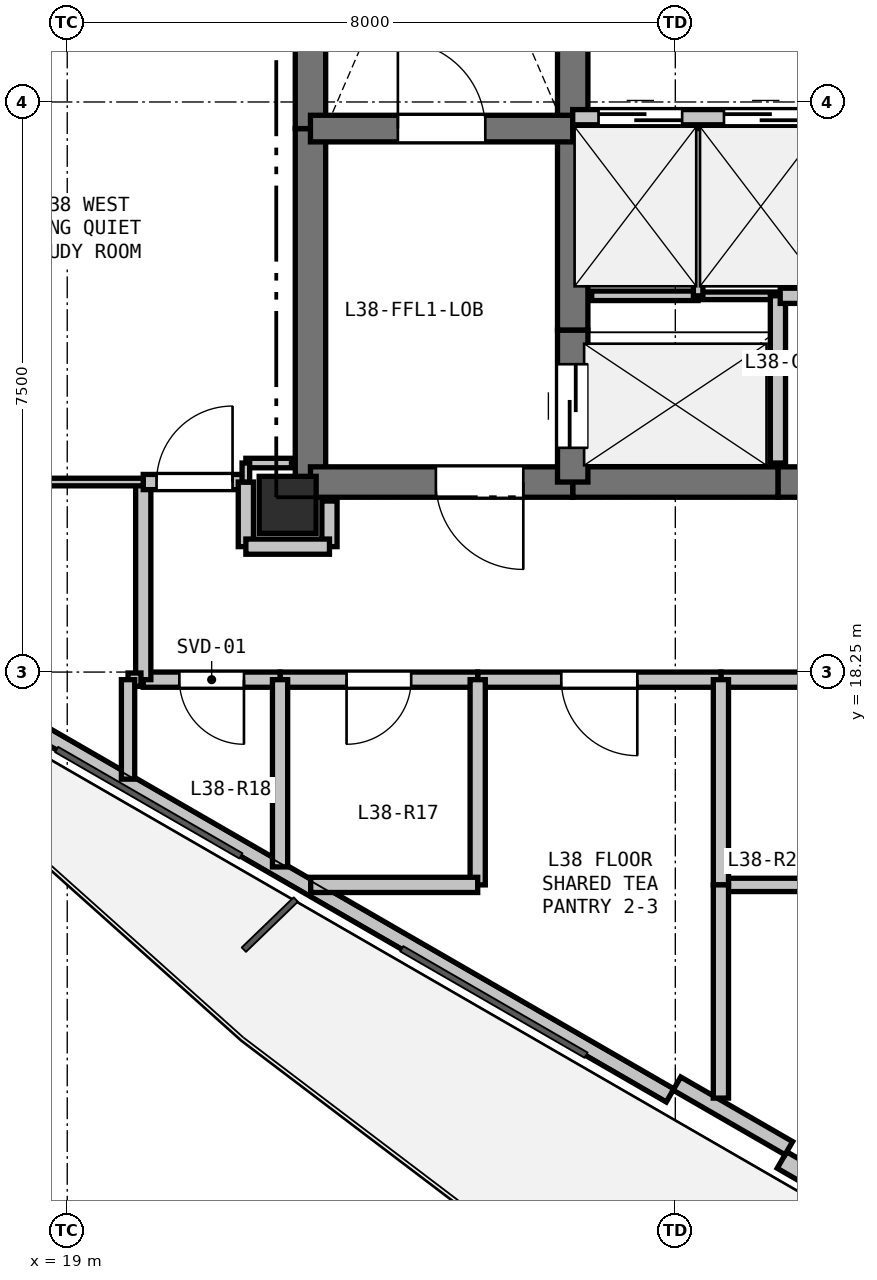
"""IFC4 building model, lengths in metres.
Left out: names, types, materials, properties, quantities, classifications, styles, units other than length and angle.
Written with IfcOpenShell. Run it as: python <this file> out.ifc"""

import sys

from ifc_helpers import new_model, si_unit, direction, frame, frame_2d, origin, origin_2d, place, context, subcontext, project, spatial, rectangle, extrude, element, fill, save


model = new_model("IFC4")
c1 = context("Model", 3, precision=1e-05, world=origin(), true_north=direction((0.0, 1.0)))
c2 = subcontext(c1, "Body", "Model", "MODEL_VIEW")
j1 = project(units=[si_unit("LENGTHUNIT", "METRE"), si_unit("PLANEANGLEUNIT", "RADIAN")], contexts=[c1])
p1 = place(None, origin())
s1 = spatial("IfcSite", under=j1, at=p1, CompositionType="ELEMENT")
p2 = place(p1, origin())
s2 = spatial("IfcBuilding", under=s1, at=p2, CompositionType="ELEMENT")
p3 = place(p2, frame((0.0, 0.0, 137.7)))
s3 = spatial("IfcBuildingStorey", under=s2, at=p3, CompositionType="ELEMENT", Elevation=137.7)
p4 = place(p3, frame((21.9, 20.45, 0.0), z_axis=(0.0, 0.0, 1.0), x_axis=(1.0, 0.0, 0.0)))
e1 = element("IfcColumn", 1, at=p4, inside=s3, PredefinedType="COLUMN", context=c2, shape_type="SweptSolid", body=[
    extrude(rectangle(XDim=0.75, YDim=0.75, at=origin_2d()), origin(), (0.0, 0.0, 1.0), 3.3),
])
p5 = place(p3, frame((38.091, 6.237, 0.0), z_axis=(0.0, 0.0, 1.0), x_axis=(-0.86602239209, 0.500005216371, 0.0)))
e2 = element("IfcWall", 2, at=p5, inside=s3, PredefinedType="SOLIDWALL", context=c2, shape_type="SweptSolid", body=[
    extrude(rectangle(XDim=11.186, YDim=0.25, at=frame_2d((5.593, 0.0))), origin(), (0.0, 0.0, 1.0), 2.68),
])
p6 = place(p5, frame((7.095, 0.0, 0.0)))
e3 = element("IfcOpeningElement", 3, at=p6, cuts=e2, PredefinedType="OPENING", context=c2, shape_type="SweptSolid", body=[
    extrude(rectangle(XDim=1.0, YDim=2.1, at=frame_2d((0.5, 1.05))), frame((0.0, 0.135, 0.0), z_axis=(0.0, -1.0, 0.0), x_axis=(1.0, 0.0, 0.0)), (0.0, 0.0, 1.0), 0.27),
])
p7 = place(p5, frame((2.02, 0.0, 0.9)))
e4 = element("IfcOpeningElement", 4, at=p7, cuts=e2, PredefinedType="OPENING", context=c2, shape_type="SweptSolid", body=[
    extrude(rectangle(XDim=1.2, YDim=1.4, at=frame_2d((0.6, 0.7))), frame((0.0, 0.135, 0.0), z_axis=(0.0, -1.0, 0.0), x_axis=(1.0, 0.0, 0.0)), (0.0, 0.0, 1.0), 0.27),
])
p8 = place(p3, frame((26.931, 12.68, 0.0), z_axis=(0.0, 0.0, 1.0), x_axis=(-0.866026619769, 0.499997893847, 0.0)))
e5 = element("IfcWall", 5, at=p8, inside=s3, PredefinedType="PARAPET", context=c2, shape_type="SweptSolid", body=[
    extrude(rectangle(XDim=10.486, YDim=0.2, at=frame_2d((5.243, 0.0))), origin(), (0.0, 0.0, 1.0), 0.2),
])
p9 = place(p3, frame((28.493, 11.986, 0.0), z_axis=(0.0, 0.0, 1.0), x_axis=(-0.86605165483, 0.499954529098, 0.0)))
e6 = element("IfcWall", 6, at=p9, inside=s3, PredefinedType="PARAPET", context=c2, shape_type="SweptSolid", body=[
    extrude(rectangle(XDim=1.7, YDim=0.2, at=frame_2d((0.85, 0.0))), origin(), (0.0, 0.0, 1.0), 2.68),
])
p10 = place(p3, frame((22.2, 20.75, 0.0), z_axis=(0.0, 0.0, 1.0), x_axis=(0.0, 1.0, 0.0)))
e7 = element("IfcWall", 7, at=p10, inside=s3, PredefinedType="SHEAR", context=c2, shape_type="SweptSolid", body=[
    extrude(rectangle(XDim=4.65, YDim=0.4, at=frame_2d((2.325, 0.0))), origin(), (0.0, 0.0, 1.0), 3.06),
])
p11 = place(p3, frame((22.2, 25.4, 0.0), z_axis=(0.0, 0.0, 1.0), x_axis=(0.0, 1.0, 0.0)))
e8 = element("IfcWall", 8, at=p11, inside=s3, PredefinedType="SHEAR", context=c2, shape_type="SweptSolid", body=[
    extrude(rectangle(XDim=7.35, YDim=0.4, at=frame_2d((3.675, 0.0))), origin(), (0.0, 0.0, 1.0), 3.06),
])
p12 = place(p3, frame((30.6, 20.75, 0.0), z_axis=(0.0, 0.0, 1.0), x_axis=(-1.0, 0.0, 0.0)))
e9 = element("IfcWall", 9, at=p12, inside=s3, PredefinedType="SHEAR", context=c2, shape_type="SweptSolid", body=[
    extrude(rectangle(XDim=2.25, YDim=0.4, at=frame_2d((1.125, 0.0))), origin(), (0.0, 0.0, 1.0), 3.06),
])
p13 = place(p12, frame((0.7, 0.0, 0.0)))
e10 = element("IfcOpeningElement", 10, at=p13, cuts=e9, PredefinedType="OPENING", context=c2, shape_type="SweptSolid", body=[
    extrude(rectangle(XDim=0.85, YDim=2.1, at=frame_2d((0.425, 1.05))), frame((0.0, 0.21, 0.0), z_axis=(0.0, -1.0, 0.0), x_axis=(1.0, 0.0, 0.0)), (0.0, 0.0, 1.0), 0.42),
])
p14 = place(p3, frame((28.35, 20.75, 0.0), z_axis=(0.0, 0.0, 1.0), x_axis=(-1.0, 0.0, 0.0)))
e11 = element("IfcWall", 11, at=p14, inside=s3, PredefinedType="SHEAR", context=c2, shape_type="SweptSolid", body=[
    extrude(rectangle(XDim=2.7, YDim=0.4, at=frame_2d((1.35, 0.0))), origin(), (0.0, 0.0, 1.0), 3.06),
])
p15 = place(p3, frame((25.65, 20.75, 0.0), z_axis=(0.0, 0.0, 1.0), x_axis=(-1.0, 0.0, 0.0)))
e12 = element("IfcWall", 12, at=p15, inside=s3, PredefinedType="SHEAR", context=c2, shape_type="SweptSolid", body=[
    extrude(rectangle(XDim=3.45, YDim=0.4, at=frame_2d((1.725, 0.0))), origin(), (0.0, 0.0, 1.0), 3.06),
])
p16 = place(p15, frame((0.65, 0.0, 0.0)))
e13 = element("IfcOpeningElement", 13, at=p16, cuts=e12, PredefinedType="OPENING", context=c2, shape_type="SweptSolid", body=[
    extrude(rectangle(XDim=1.15, YDim=2.15, at=frame_2d((0.575, 1.075))), frame((0.0, 0.21, 0.0), z_axis=(0.0, -1.0, 0.0), x_axis=(1.0, 0.0, 0.0)), (0.0, 0.0, 1.0), 0.42),
])
p17 = place(p3, frame((25.65, 20.75, 0.0), z_axis=(0.0, 0.0, 1.0), x_axis=(0.0, 1.0, 0.0)))
e14 = element("IfcWall", 14, at=p17, inside=s3, PredefinedType="SHEAR", context=c2, shape_type="SweptSolid", body=[
    extrude(rectangle(XDim=2.0, YDim=0.4, at=frame_2d((1.0, 0.0))), origin(), (0.0, 0.0, 1.0), 3.06),
])
p18 = place(p17, frame((0.45, 0.0, 0.0)))
e15 = element("IfcOpeningElement", 15, at=p18, cuts=e14, PredefinedType="OPENING", context=c2, shape_type="SweptSolid", body=[
    extrude(rectangle(XDim=1.1, YDim=2.15, at=frame_2d((0.55, 1.075))), frame((0.0, 0.21, 0.0), z_axis=(0.0, -1.0, 0.0), x_axis=(1.0, 0.0, 0.0)), (0.0, 0.0, 1.0), 0.42),
])
p19 = place(p3, frame((25.65, 22.75, 0.0), z_axis=(0.0, 0.0, 1.0), x_axis=(0.0, 1.0, 0.0)))
e16 = element("IfcWall", 16, at=p19, inside=s3, PredefinedType="SHEAR", context=c2, shape_type="SweptSolid", body=[
    extrude(rectangle(XDim=2.8, YDim=0.4, at=frame_2d((1.4, 0.0))), origin(), (0.0, 0.0, 1.0), 3.06),
])
p20 = place(p3, frame((25.65, 25.55, 0.0), z_axis=(0.0, 0.0, 1.0), x_axis=(0.0, 1.0, 0.0)))
e17 = element("IfcWall", 17, at=p20, inside=s3, PredefinedType="SHEAR", context=c2, shape_type="SweptSolid", body=[
    extrude(rectangle(XDim=2.4, YDim=0.4, at=frame_2d((1.2, 0.0))), origin(), (0.0, 0.0, 1.0), 3.06),
])
p21 = place(p3, frame((22.2, 25.4, 0.0), z_axis=(0.0, 0.0, 1.0), x_axis=(1.0, 0.0, 0.0)))
e18 = element("IfcWall", 18, at=p21, inside=s3, PredefinedType="SHEAR", context=c2, shape_type="SweptSolid", body=[
    extrude(rectangle(XDim=3.45, YDim=0.35, at=frame_2d((1.725, 0.0))), origin(), (0.0, 0.0, 1.0), 3.06),
])
p22 = place(p21, frame((1.15, 0.0, 0.0)))
e19 = element("IfcOpeningElement", 19, at=p22, cuts=e18, PredefinedType="OPENING", context=c2, shape_type="SweptSolid", body=[
    extrude(rectangle(XDim=1.15, YDim=2.15, at=frame_2d((0.575, 1.075))), frame((0.0, 0.185, 0.0), z_axis=(0.0, -1.0, 0.0), x_axis=(1.0, 0.0, 0.0)), (0.0, 0.0, 1.0), 0.37),
])
p23 = place(p3, frame((25.65, 25.55, 0.0), z_axis=(0.0, 0.0, 1.0), x_axis=(1.0, 0.0, 0.0)))
e20 = element("IfcWall", 20, at=p23, inside=s3, PredefinedType="PARTITIONING", context=c2, shape_type="SweptSolid", body=[
    extrude(rectangle(XDim=4.95, YDim=0.2, at=frame_2d((2.475, 0.0))), origin(), (0.0, 0.0, 1.0), 3.06),
])
p24 = place(p23, frame((0.34, 0.0, 0.0)))
e21 = element("IfcOpeningElement", 21, at=p24, cuts=e20, PredefinedType="OPENING", context=c2, shape_type="SweptSolid", body=[
    extrude(rectangle(XDim=1.1, YDim=2.15, at=frame_2d((0.55, 1.075))), frame((0.0, 0.11, 0.0), z_axis=(0.0, -1.0, 0.0), x_axis=(1.0, 0.0, 0.0)), (0.0, 0.0, 1.0), 0.22),
])
p25 = place(p23, frame((1.99, 0.0, 0.0)))
e22 = element("IfcOpeningElement", 22, at=p25, cuts=e20, PredefinedType="OPENING", context=c2, shape_type="SweptSolid", body=[
    extrude(rectangle(XDim=1.1, YDim=2.15, at=frame_2d((0.55, 1.075))), frame((0.0, 0.11, 0.0), z_axis=(0.0, -1.0, 0.0), x_axis=(1.0, 0.0, 0.0)), (0.0, 0.0, 1.0), 0.22),
])
p26 = place(p23, frame((3.64, 0.0, 0.0)))
e23 = element("IfcOpeningElement", 23, at=p26, cuts=e20, PredefinedType="OPENING", context=c2, shape_type="SweptSolid", body=[
    extrude(rectangle(XDim=1.1, YDim=2.15, at=frame_2d((0.55, 1.075))), frame((0.0, 0.11, 0.0), z_axis=(0.0, -1.0, 0.0), x_axis=(1.0, 0.0, 0.0)), (0.0, 0.0, 1.0), 0.22),
])
p27 = place(p3, frame((25.9, 23.2, 0.0), z_axis=(0.0, 0.0, 1.0), x_axis=(1.0, 0.0, 0.0)))
e24 = element("IfcWall", 24, at=p27, inside=s3, PredefinedType="PARTITIONING", context=c2, shape_type="SweptSolid", body=[
    extrude(rectangle(XDim=1.4, YDim=0.125, at=frame_2d((0.7, 0.0))), origin(), (0.0, 0.0, 1.0), 3.06),
])
p28 = place(p3, frame((27.3, 23.2, 0.0), z_axis=(0.0, 0.0, 1.0), x_axis=(1.0, 0.0, 0.0)))
e25 = element("IfcWall", 25, at=p28, inside=s3, PredefinedType="PARTITIONING", context=c2, shape_type="SweptSolid", body=[
    extrude(rectangle(XDim=1.05, YDim=0.1, at=frame_2d((0.525, 0.0))), origin(), (0.0, 0.0, 1.0), 3.06),
])
p29 = place(p3, frame((28.35, 23.2, 0.0), z_axis=(0.0, 0.0, 1.0), x_axis=(0.0, -1.0, 0.0)))
e26 = element("IfcWall", 26, at=p29, inside=s3, PredefinedType="PARTITIONING", context=c2, shape_type="SweptSolid", body=[
    extrude(rectangle(XDim=2.2, YDim=0.2, at=frame_2d((1.1, 0.0))), origin(), (0.0, 0.0, 1.0), 3.06),
])
p30 = place(p3, frame((27.3, 25.4, 0.0), z_axis=(0.0, 0.0, 1.0), x_axis=(0.0, -1.0, 0.0)))
e27 = element("IfcWall", 27, at=p30, inside=s3, PredefinedType="PARTITIONING", context=c2, shape_type="SweptSolid", body=[
    extrude(rectangle(XDim=2.2, YDim=0.125, at=frame_2d((1.1, 0.0))), origin(), (0.0, 0.0, 1.0), 3.06),
])
p31 = place(p3, frame((28.95, 23.2, 0.0), z_axis=(0.0, 0.0, 1.0), x_axis=(-1.0, 0.0, 0.0)))
e28 = element("IfcWall", 28, at=p31, inside=s3, PredefinedType="PARTITIONING", context=c2, shape_type="SweptSolid", body=[
    extrude(rectangle(XDim=0.57, YDim=0.2, at=frame_2d((0.285, 0.0))), origin(), (0.0, 0.0, 1.0), 3.06),
])
p32 = place(p3, frame((22.45, 19.9, 0.0), z_axis=(0.0, 0.0, 1.0), x_axis=(0.0, 1.0, 0.0)))
e29 = element("IfcWall", 29, at=p32, inside=s3, PredefinedType="PARTITIONING", context=c2, shape_type="SweptSolid", body=[
    extrude(rectangle(XDim=0.6, YDim=0.2, at=frame_2d((0.3, 0.0))), origin(), (0.0, 0.0, 1.0), 2.433),
])
p33 = place(p3, frame((29.6, 18.15, 0.0), z_axis=(0.0, 0.0, 1.0), x_axis=(-1.0, 0.0, 0.0)))
e30 = element("IfcWall", 30, at=p33, inside=s3, PredefinedType="PARTITIONING", context=c2, shape_type="SweptSolid", body=[
    extrude(rectangle(XDim=2.0, YDim=0.2, at=frame_2d((1.0, 0.0))), origin(), (0.0, 0.0, 1.0), 3.06),
])
p34 = place(p3, frame((27.6, 18.15, 0.0), z_axis=(0.0, 0.0, 1.0), x_axis=(-1.0, 0.0, 0.0)))
e31 = element("IfcWall", 31, at=p34, inside=s3, PredefinedType="PARTITIONING", context=c2, shape_type="SweptSolid", body=[
    extrude(rectangle(XDim=3.2, YDim=0.2, at=frame_2d((1.6, 0.0))), origin(), (0.0, 0.0, 1.0), 2.433),
])
p35 = place(p34, frame((1.1, 0.0, 0.0)))
e32 = element("IfcOpeningElement", 32, at=p35, cuts=e31, PredefinedType="OPENING", context=c2, shape_type="SweptSolid", body=[
    extrude(rectangle(XDim=1.0, YDim=2.15, at=frame_2d((0.5, 1.075))), frame((0.0, 0.11, 0.0), z_axis=(0.0, -1.0, 0.0), x_axis=(1.0, 0.0, 0.0)), (0.0, 0.0, 1.0), 0.22),
])
p36 = place(p3, frame((24.4, 18.15, 0.0), z_axis=(0.0, 0.0, 1.0), x_axis=(-1.0, 0.0, 0.0)))
e33 = element("IfcWall", 33, at=p36, inside=s3, PredefinedType="PARTITIONING", context=c2, shape_type="SweptSolid", body=[
    extrude(rectangle(XDim=2.6, YDim=0.2, at=frame_2d((1.3, 0.0))), origin(), (0.0, 0.0, 1.0), 2.433),
])
p37 = place(p36, frame((0.875, 0.0, 0.0)))
e34 = element("IfcOpeningElement", 34, at=p37, cuts=e33, PredefinedType="OPENING", context=c2, shape_type="SweptSolid", body=[
    extrude(rectangle(XDim=0.85, YDim=2.1, at=frame_2d((0.425, 1.05))), frame((0.0, 0.11, 0.0), z_axis=(0.0, -1.0, 0.0), x_axis=(1.0, 0.0, 0.0)), (0.0, 0.0, 1.0), 0.22),
])
p38 = place(p3, frame((21.8, 18.15, 0.0), z_axis=(0.0, 0.0, 1.0), x_axis=(-1.0, 0.0, 0.0)))
e35 = element("IfcWall", 35, at=p38, inside=s3, PredefinedType="PARTITIONING", context=c2, shape_type="SweptSolid", body=[
    extrude(rectangle(XDim=1.8, YDim=0.2, at=frame_2d((0.9, 0.0))), origin(), (0.0, 0.0, 1.0), 3.06),
])
p39 = place(p38, frame((0.475, 0.0, 0.0)))
e36 = element("IfcOpeningElement", 36, at=p39, cuts=e35, PredefinedType="OPENING", context=c2, shape_type="SweptSolid", body=[
    extrude(rectangle(XDim=0.85, YDim=2.1, at=frame_2d((0.425, 1.05))), frame((0.0, 0.11, 0.0), z_axis=(0.0, -1.0, 0.0), x_axis=(1.0, 0.0, 0.0)), (0.0, 0.0, 1.0), 0.22),
])
p40 = place(p3, frame((20.0, 18.15, 0.0), z_axis=(0.0, 0.0, 1.0), x_axis=(0.0, 1.0, 0.0)))
e37 = element("IfcWall", 37, at=p40, inside=s3, PredefinedType="PARTITIONING", context=c2, shape_type="SweptSolid", body=[
    extrude(rectangle(XDim=2.6, YDim=0.2, at=frame_2d((1.3, 0.0))), origin(), (0.0, 0.0, 1.0), 3.06),
])
p41 = place(p3, frame((20.0, 20.75, 0.0), z_axis=(0.0, 0.0, 1.0), x_axis=(1.0, 0.0, 0.0)))
e38 = element("IfcWall", 38, at=p41, inside=s3, PredefinedType="PARTITIONING", context=c2, shape_type="SweptSolid", body=[
    extrude(rectangle(XDim=1.35, YDim=0.2, at=frame_2d((0.675, 0.0))), origin(), (0.0, 0.0, 1.0), 2.433),
])
p42 = place(p41, frame((0.175, 0.0, 0.0)))
e39 = element("IfcOpeningElement", 39, at=p42, cuts=e38, PredefinedType="OPENING", context=c2, shape_type="SweptSolid", body=[
    extrude(rectangle(XDim=1.0, YDim=2.15, at=frame_2d((0.5, 1.075))), frame((0.0, 0.11, 0.0), z_axis=(0.0, -1.0, 0.0), x_axis=(1.0, 0.0, 0.0)), (0.0, 0.0, 1.0), 0.22),
])
p43 = place(p3, frame((21.35, 20.75, 0.0), z_axis=(0.0, 0.0, 1.0), x_axis=(0.0, -1.0, 0.0)))
e40 = element("IfcWall", 40, at=p43, inside=s3, PredefinedType="PARTITIONING", context=c2, shape_type="SweptSolid", body=[
    extrude(rectangle(XDim=0.85, YDim=0.2, at=frame_2d((0.425, 0.0))), origin(), (0.0, 0.0, 1.0), 2.433),
])
p44 = place(p3, frame((21.35, 19.9, 0.0), z_axis=(0.0, 0.0, 1.0), x_axis=(1.0, 0.0, 0.0)))
e41 = element("IfcWall", 41, at=p44, inside=s3, PredefinedType="PARTITIONING", context=c2, shape_type="SweptSolid", body=[
    extrude(rectangle(XDim=1.1, YDim=0.2, at=frame_2d((0.55, 0.0))), origin(), (0.0, 0.0, 1.0), 2.433),
])
p45 = place(p3, frame((19.8, 18.15, 0.0), z_axis=(0.0, 0.0, 1.0), x_axis=(1.0, 0.0, 0.0)))
e42 = element("IfcWall", 42, at=p45, inside=s3, PredefinedType="PLUMBINGWALL", context=c2, shape_type="SweptSolid", body=[
    extrude(rectangle(XDim=0.17, YDim=0.175, at=frame_2d((0.085, 0.0))), origin(), (0.0, 0.0, 1.0), 3.06),
])
p46 = place(p3, frame((21.8, 18.15, 0.0), z_axis=(0.0, 0.0, 1.0), x_axis=(0.0, -1.0, 0.0)))
e43 = element("IfcWall", 43, at=p46, inside=s3, PredefinedType="PARTITIONING", context=c2, shape_type="SweptSolid", body=[
    extrude(rectangle(XDim=2.463, YDim=0.2, at=frame_2d((1.232, 0.0))), origin(), (0.0, 0.0, 1.0), 2.365),
])
p47 = place(p3, frame((19.8, 16.841, 0.0), z_axis=(0.0, 0.0, 1.0), x_axis=(0.0, 1.0, 0.0)))
e44 = element("IfcWall", 44, at=p47, inside=s3, PredefinedType="PLUMBINGWALL", context=c2, shape_type="SweptSolid", body=[
    extrude(rectangle(XDim=1.309, YDim=0.175, at=frame_2d((0.654, 0.0))), origin(), (0.0, 0.0, 1.0), 2.365),
])
p48 = place(p3, frame((29.6, 15.45, 0.0), z_axis=(0.0, 0.0, 1.0), x_axis=(-1.0, 0.0, 0.0)))
e45 = element("IfcWall", 45, at=p48, inside=s3, PredefinedType="PLUMBINGWALL", context=c2, shape_type="SweptSolid", body=[
    extrude(rectangle(XDim=2.0, YDim=0.175, at=frame_2d((1.0, 0.0))), origin(), (0.0, 0.0, 1.0), 3.06),
])
p49 = place(p3, frame((27.6, 15.45, 0.0), z_axis=(0.0, 0.0, 1.0), x_axis=(0.0, 1.0, 0.0)))
e46 = element("IfcWall", 46, at=p49, inside=s3, PredefinedType="PARTITIONING", context=c2, shape_type="SweptSolid", body=[
    extrude(rectangle(XDim=2.7, YDim=0.2, at=frame_2d((1.35, 0.0))), origin(), (0.0, 0.0, 1.0), 3.06),
])
p50 = place(p3, frame((20.0, 20.75, 0.0), z_axis=(0.0, 0.0, 1.0), x_axis=(-1.0, 0.0, 0.0)))
e47 = element("IfcWall", 47, at=p50, inside=s3, PredefinedType="PARTITIONING", context=c2, shape_type="SweptSolid", body=[
    extrude(rectangle(XDim=3.5, YDim=0.1, at=frame_2d((1.75, 0.0))), origin(), (0.0, 0.0, 1.0), 3.06),
])
p51 = place(p3, frame((21.95, 21.0, 0.0), z_axis=(0.0, 0.0, 1.0), x_axis=(-1.0, 0.0, 0.0)))
e48 = element("IfcWall", 48, at=p51, inside=s3, PredefinedType="PARTITIONING", context=c2, shape_type="SweptSolid", body=[
    extrude(rectangle(XDim=0.6, YDim=0.125, at=frame_2d((0.3, 0.0))), origin(), (0.0, 0.0, 1.0), 2.508),
])
p52 = place(p3, frame((21.35, 21.0, 0.0), z_axis=(0.0, 0.0, 1.0), x_axis=(0.0, -1.0, 0.0)))
e49 = element("IfcWall", 49, at=p52, inside=s3, PredefinedType="PARTITIONING", context=c2, shape_type="SweptSolid", body=[
    extrude(rectangle(XDim=0.25, YDim=0.1, at=frame_2d((0.125, 0.0))), origin(), (0.0, 0.0, 1.0), 3.06),
])
p53 = place(p3, frame((24.4, 18.15, 0.0), z_axis=(0.0, 0.0, 1.0), x_axis=(0.0, -1.0, 0.0)))
e50 = element("IfcWall", 50, at=p53, inside=s3, PredefinedType="PARTITIONING", context=c2, shape_type="SweptSolid", body=[
    extrude(rectangle(XDim=2.7, YDim=0.2, at=frame_2d((1.35, 0.0))), origin(), (0.0, 0.0, 1.0), 2.433),
])
p54 = place(p3, frame((24.4, 15.45, 0.0), z_axis=(0.0, 0.0, 1.0), x_axis=(-1.0, 0.0, 0.0)))
e51 = element("IfcWall", 51, at=p54, inside=s3, PredefinedType="PARTITIONING", context=c2, shape_type="SweptSolid", body=[
    extrude(rectangle(XDim=2.197, YDim=0.2, at=frame_2d((1.099, 0.0))), origin(), (0.0, 0.0, 1.0), 2.365),
])
p55 = place(p3, frame((27.6, 15.45, 0.0), z_axis=(0.0, 0.0, 1.0), x_axis=(0.0, -1.0, 0.0)))
e52 = element("IfcWall", 52, at=p55, inside=s3, PredefinedType="PARTITIONING", context=c2, shape_type="SweptSolid", body=[
    extrude(rectangle(XDim=2.805, YDim=0.2, at=frame_2d((1.402, 0.0))), origin(), (0.0, 0.0, 1.0), 2.365),
])
p56 = place(p24, origin())
e53 = element("IfcDoor", 53, at=p56, inside=s3, OperationType="SLIDING_TO_LEFT", PredefinedType="DOOR", context=c2, shape_type="SweptSolid", body=[
    extrude(rectangle(XDim=1.1, YDim=2.15, at=frame_2d((0.55, 1.075))), frame((0.0, 0.025, 0.0), z_axis=(0.0, -1.0, 0.0), x_axis=(1.0, 0.0, 0.0)), (0.0, 0.0, 1.0), 0.05),
])
fill(e21, e53)
p57 = place(p25, origin())
e54 = element("IfcDoor", 54, at=p57, inside=s3, OperationType="SLIDING_TO_LEFT", PredefinedType="DOOR", context=c2, shape_type="SweptSolid", body=[
    extrude(rectangle(XDim=1.1, YDim=2.15, at=frame_2d((0.55, 1.075))), frame((0.0, 0.025, 0.0), z_axis=(0.0, -1.0, 0.0), x_axis=(1.0, 0.0, 0.0)), (0.0, 0.0, 1.0), 0.05),
])
fill(e22, e54)
p58 = place(p18, origin())
e55 = element("IfcDoor", 55, at=p58, inside=s3, OperationType="SLIDING_TO_LEFT", PredefinedType="DOOR", context=c2, shape_type="SweptSolid", body=[
    extrude(rectangle(XDim=1.1, YDim=2.15, at=frame_2d((0.55, 1.075))), frame((0.0, 0.025, 0.0), z_axis=(0.0, -1.0, 0.0), x_axis=(1.0, 0.0, 0.0)), (0.0, 0.0, 1.0), 0.05),
])
fill(e15, e55)
p59 = place(p22, origin())
e56 = element("IfcDoor", 56, at=p59, inside=s3, OperationType="SINGLE_SWING_LEFT", PredefinedType="DOOR", context=c2, shape_type="SweptSolid", body=[
    extrude(rectangle(XDim=1.15, YDim=2.15, at=frame_2d((0.575, 1.075))), frame((0.0, 0.025, 0.0), z_axis=(0.0, -1.0, 0.0), x_axis=(1.0, 0.0, 0.0)), (0.0, 0.0, 1.0), 0.05),
])
fill(e19, e56)
p60 = place(p16, origin())
e57 = element("IfcDoor", 57, at=p60, inside=s3, OperationType="SINGLE_SWING_LEFT", PredefinedType="DOOR", context=c2, shape_type="SweptSolid", body=[
    extrude(rectangle(XDim=1.15, YDim=2.15, at=frame_2d((0.575, 1.075))), frame((0.0, 0.025, 0.0), z_axis=(0.0, -1.0, 0.0), x_axis=(1.0, 0.0, 0.0)), (0.0, 0.0, 1.0), 0.05),
])
fill(e13, e57)
p61 = place(p39, origin())
e58 = element("IfcDoor", 58, at=p61, inside=s3, OperationType="SINGLE_SWING_LEFT", PredefinedType="DOOR", context=c2, shape_type="SweptSolid", body=[
    extrude(rectangle(XDim=0.85, YDim=2.1, at=frame_2d((0.425, 1.05))), frame((0.0, 0.025, 0.0), z_axis=(0.0, -1.0, 0.0), x_axis=(1.0, 0.0, 0.0)), (0.0, 0.0, 1.0), 0.05),
])
fill(e36, e58)
p62 = place(p42, origin())
e59 = element("IfcDoor", 59, at=p62, inside=s3, OperationType="SINGLE_SWING_RIGHT", PredefinedType="DOOR", context=c2, shape_type="SweptSolid", body=[
    extrude(rectangle(XDim=1.0, YDim=2.15, at=frame_2d((0.5, 1.075))), frame((0.0, 0.025, 0.0), z_axis=(0.0, -1.0, 0.0), x_axis=(1.0, 0.0, 0.0)), (0.0, 0.0, 1.0), 0.05),
])
fill(e39, e59)
p63 = place(p37, origin())
e60 = element("IfcDoor", 60, at=p63, inside=s3, OperationType="SINGLE_SWING_RIGHT", PredefinedType="DOOR", context=c2, shape_type="SweptSolid", body=[
    extrude(rectangle(XDim=0.85, YDim=2.1, at=frame_2d((0.425, 1.05))), frame((0.0, 0.025, 0.0), z_axis=(0.0, -1.0, 0.0), x_axis=(1.0, 0.0, 0.0)), (0.0, 0.0, 1.0), 0.05),
])
fill(e34, e60)
p64 = place(p35, origin())
e61 = element("IfcDoor", 61, at=p64, inside=s3, OperationType="SINGLE_SWING_LEFT", PredefinedType="DOOR", context=c2, shape_type="SweptSolid", body=[
    extrude(rectangle(XDim=1.0, YDim=2.15, at=frame_2d((0.5, 1.075))), frame((0.0, 0.025, 0.0), z_axis=(0.0, -1.0, 0.0), x_axis=(1.0, 0.0, 0.0)), (0.0, 0.0, 1.0), 0.05),
])
fill(e32, e61)
save(model, sys.argv[1])
